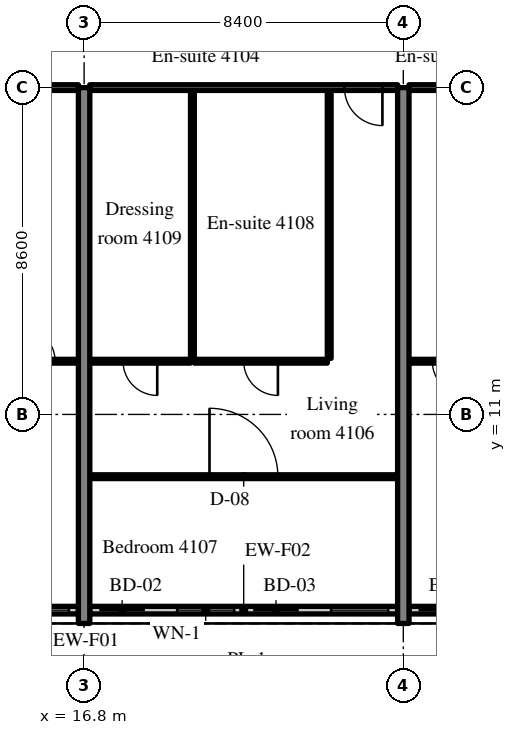
"""IFC4 building model, lengths in metres.
Left out: names, types, materials, properties, quantities, classifications, styles, units other than length and angle.
Written with IfcOpenShell. Run it as: python <this file> out.ifc"""

import sys

from ifc_helpers import new_model, si_unit, direction, frame, frame_2d, origin, place, context, subcontext, project, spatial, rectangle, extrude, source, transform, mapped, element, fill, save


model = new_model("IFC4")
c1 = context("Model", 3, precision=1e-05, world=origin(), true_north=direction((0.0, 1.0)))
c2 = subcontext(c1, "Body", "Model", "MODEL_VIEW")
j1 = project(units=[si_unit("LENGTHUNIT", "METRE"), si_unit("PLANEANGLEUNIT", "RADIAN")], contexts=[c1])
p1 = place(None, origin())
s1 = spatial("IfcSite", under=j1, at=p1, CompositionType="ELEMENT")
p2 = place(p1, origin())
s2 = spatial("IfcBuilding", under=s1, at=p2, CompositionType="ELEMENT")
p3 = place(p2, frame((0.0, 0.0, 170.6)))
s3 = spatial("IfcBuildingStorey", under=s2, at=p3, CompositionType="ELEMENT", Elevation=170.6)
m1 = source(origin(), c2, "Body", "SweptSolid", [
    extrude(rectangle(XDim=14.1, YDim=0.3, at=frame_2d((7.05, 0.0))), origin(), (0.0, 0.0, 1.0), 3.52),
])
for number, where, z_axis, x_axis in (
    (1, (16.8, 5.5, 0.0), (0.0, 0.0, 1.0), (0.0, 1.0, 0.0)),
    (2, (25.2, 5.5, 0.0), (0.0, 0.0, 1.0), (0.0, 1.0, 0.0)),
):
    element("IfcWall", number, at=place(p3, frame(where, z_axis=z_axis, x_axis=x_axis)), inside=s3, PredefinedType="SHEAR", context=c2, shape_type="MappedRepresentation", body=[
        mapped(m1, transform((0.0, 0.0, 0.0), scale=1.0)),
    ])
m2 = source(origin(), c2, "Body", "SweptSolid", [
    extrude(rectangle(XDim=4.105, YDim=0.2, at=frame_2d((2.052, 0.0))), origin(), (0.0, 0.0, 1.0), 2.87),
])
p4 = place(p3, frame((12.545, 5.85, 0.0), z_axis=(0.0, 0.0, 1.0), x_axis=(1.0, 0.0, 0.0)))
e3 = element("IfcWall", 3, at=p4, inside=s3, PredefinedType="SOLIDWALL", context=c2, shape_type="MappedRepresentation", body=[
    mapped(m2, transform((0.0, 0.0, 0.0), scale=1.0)),
])
m3 = source(origin(), c2, "Body", "SweptSolid", [
    extrude(rectangle(XDim=1.2, YDim=2.4, at=frame_2d((0.6, 1.2))), frame((0.0, 0.11, 0.0), z_axis=(0.0, -1.0, 0.0), x_axis=(1.0, 0.0, 0.0)), (0.0, 0.0, 1.0), 0.22),
])
p5 = place(p4, frame((0.25, 0.0, 0.0)))
e4 = element("IfcOpeningElement", 4, at=p5, cuts=e3, PredefinedType="OPENING", context=c2, shape_type="MappedRepresentation", body=[
    mapped(m3, transform((0.0, 0.0, 0.0), scale=1.0)),
])
m4 = source(origin(), c2, "Body", "SweptSolid", [
    extrude(rectangle(XDim=1.5, YDim=1.5, at=frame_2d((0.75, 0.75))), frame((0.0, 0.11, 0.0), z_axis=(0.0, -1.0, 0.0), x_axis=(1.0, 0.0, 0.0)), (0.0, 0.0, 1.0), 0.22),
])
p6 = place(p4, frame((2.355, 0.0, 0.9)))
e5 = element("IfcOpeningElement", 5, at=p6, cuts=e3, PredefinedType="OPENING", context=c2, shape_type="MappedRepresentation", body=[
    mapped(m4, transform((0.0, 0.0, 0.0), scale=1.0)),
])
m5 = source(origin(), c2, "Body", "SweptSolid", [
    extrude(rectangle(XDim=8.1, YDim=0.2, at=frame_2d((4.05, 0.0))), origin(), (0.0, 0.0, 1.0), 2.87),
])
p7 = place(p3, frame((16.95, 5.85, 0.0), z_axis=(0.0, 0.0, 1.0), x_axis=(1.0, 0.0, 0.0)))
e6 = element("IfcWall", 6, at=p7, inside=s3, PredefinedType="SOLIDWALL", context=c2, shape_type="MappedRepresentation", body=[
    mapped(m5, transform((0.0, 0.0, 0.0), scale=1.0)),
])
p8 = place(p7, frame((0.25, 0.0, 0.0)))
e7 = element("IfcOpeningElement", 7, at=p8, cuts=e6, PredefinedType="OPENING", context=c2, shape_type="MappedRepresentation", body=[
    mapped(m3, transform((0.0, 0.0, 0.0), scale=1.0)),
])
p9 = place(p7, frame((2.3, 0.0, 0.9)))
e8 = element("IfcOpeningElement", 8, at=p9, cuts=e6, PredefinedType="OPENING", context=c2, shape_type="MappedRepresentation", body=[
    mapped(m4, transform((0.0, 0.0, 0.0), scale=1.0)),
])
p10 = place(p7, frame((4.3, 0.0, 0.0)))
e9 = element("IfcOpeningElement", 9, at=p10, cuts=e6, PredefinedType="OPENING", context=c2, shape_type="MappedRepresentation", body=[
    mapped(m3, transform((0.0, 0.0, 0.0), scale=1.0)),
])
p11 = place(p7, frame((6.35, 0.0, 0.9)))
e10 = element("IfcOpeningElement", 10, at=p11, cuts=e6, PredefinedType="OPENING", context=c2, shape_type="MappedRepresentation", body=[
    mapped(m4, transform((0.0, 0.0, 0.0), scale=1.0)),
])
m6 = source(origin(), c2, "Body", "SweptSolid", [
    extrude(rectangle(XDim=8.1, YDim=0.2, at=frame_2d((4.05, 0.0))), origin(), (0.0, 0.0, 1.0), 2.87),
])
p12 = place(p3, frame((25.35, 5.85, 0.0), z_axis=(0.0, 0.0, 1.0), x_axis=(1.0, 0.0, 0.0)))
e11 = element("IfcWall", 11, at=p12, inside=s3, PredefinedType="SOLIDWALL", context=c2, shape_type="MappedRepresentation", body=[
    mapped(m6, transform((0.0, 0.0, 0.0), scale=1.0)),
])
p13 = place(p12, frame((0.25, 0.0, 0.0)))
e12 = element("IfcOpeningElement", 12, at=p13, cuts=e11, PredefinedType="OPENING", context=c2, shape_type="MappedRepresentation", body=[
    mapped(m3, transform((0.0, 0.0, 0.0), scale=1.0)),
])
p14 = place(p12, frame((2.3, 0.0, 0.9)))
e13 = element("IfcOpeningElement", 13, at=p14, cuts=e11, PredefinedType="OPENING", context=c2, shape_type="MappedRepresentation", body=[
    mapped(m4, transform((0.0, 0.0, 0.0), scale=1.0)),
])
p15 = place(p12, frame((4.3, 0.0, 0.0)))
e14 = element("IfcOpeningElement", 14, at=p15, cuts=e11, PredefinedType="OPENING", context=c2, shape_type="MappedRepresentation", body=[
    mapped(m3, transform((0.0, 0.0, 0.0), scale=1.0)),
])
p16 = place(p12, frame((6.35, 0.0, 0.9)))
e15 = element("IfcOpeningElement", 15, at=p16, cuts=e11, PredefinedType="OPENING", context=c2, shape_type="MappedRepresentation", body=[
    mapped(m4, transform((0.0, 0.0, 0.0), scale=1.0)),
])
m7 = source(origin(), c2, "Body", "SweptSolid", [
    extrude(rectangle(XDim=2.125, YDim=0.1, at=frame_2d((1.062, 0.0))), origin(), (0.0, 0.0, 1.0), 3.52),
])
p17 = place(p3, frame((14.525, 12.4, 0.0), z_axis=(0.0, 0.0, 1.0), x_axis=(1.0, 0.0, 0.0)))
e16 = element("IfcWall", 16, at=p17, inside=s3, PredefinedType="PARTITIONING", context=c2, shape_type="MappedRepresentation", body=[
    mapped(m7, transform((0.0, 0.0, 0.0), scale=1.0)),
])
m8 = source(origin(), c2, "Body", "SweptSolid", [
    extrude(rectangle(XDim=0.9, YDim=2.1, at=frame_2d((0.45, 1.05))), frame((0.0, 0.06, 0.0), z_axis=(0.0, -1.0, 0.0), x_axis=(1.0, 0.0, 0.0)), (0.0, 0.0, 1.0), 0.12),
])
p18 = place(p17, frame((0.612, 0.0, 0.0)))
e17 = element("IfcOpeningElement", 17, at=p18, cuts=e16, PredefinedType="OPENING", context=c2, shape_type="MappedRepresentation", body=[
    mapped(m8, transform((0.0, 0.0, 0.0), scale=1.0)),
])
m9 = source(origin(), c2, "Body", "SweptSolid", [
    extrude(rectangle(XDim=3.975, YDim=0.15, at=frame_2d((1.987, 0.0))), origin(), (0.0, 0.0, 1.0), 2.82),
])
p19 = place(p3, frame((12.675, 19.6, 0.0), z_axis=(0.0, 0.0, 1.0), x_axis=(1.0, 0.0, 0.0)))
e18 = element("IfcWall", 18, at=p19, inside=s3, PredefinedType="PARTITIONING", context=c2, shape_type="MappedRepresentation", body=[
    mapped(m9, transform((0.0, 0.0, 0.0), scale=1.0)),
])
m10 = source(origin(), c2, "Body", "SweptSolid", [
    extrude(rectangle(XDim=1.0, YDim=2.1, at=frame_2d((0.5, 1.05))), frame((0.0, 0.085, 0.0), z_axis=(0.0, -1.0, 0.0), x_axis=(1.0, 0.0, 0.0)), (0.0, 0.0, 1.0), 0.17),
])
p20 = place(p19, frame((0.4, 0.0, 0.0)))
e19 = element("IfcOpeningElement", 19, at=p20, cuts=e18, PredefinedType="OPENING", context=c2, shape_type="MappedRepresentation", body=[
    mapped(m10, transform((0.0, 0.0, 0.0), scale=1.0)),
])
m11 = source(origin(), c2, "Body", "SweptSolid", [
    extrude(rectangle(XDim=7.05, YDim=0.1, at=frame_2d((3.525, 0.0))), origin(), (0.0, 0.0, 1.0), 3.52),
])
for number, where, z_axis, x_axis in (
    (20, (23.25, 12.475, 0.0), (0.0, 0.0, 1.0), (0.0, 1.0, 0.0)),
    (21, (19.65, 12.475, 0.0), (0.0, 0.0, 1.0), (0.0, 1.0, 0.0)),
):
    element("IfcWall", number, at=place(p3, frame(where, z_axis=z_axis, x_axis=x_axis)), inside=s3, PredefinedType="PARTITIONING", context=c2, shape_type="MappedRepresentation", body=[
        mapped(m11, transform((0.0, 0.0, 0.0), scale=1.0)),
    ])
m12 = source(origin(), c2, "Body", "SweptSolid", [
    extrude(rectangle(XDim=3.5, YDim=0.1, at=frame_2d((1.75, 0.0))), origin(), (0.0, 0.0, 1.0), 3.52),
])
p21 = place(p3, frame((19.7, 12.4, 0.0), z_axis=(0.0, 0.0, 1.0), x_axis=(1.0, 0.0, 0.0)))
e22 = element("IfcWall", 22, at=p21, inside=s3, PredefinedType="PARTITIONING", context=c2, shape_type="MappedRepresentation", body=[
    mapped(m12, transform((0.0, 0.0, 0.0), scale=1.0)),
])
p22 = place(p21, frame((1.3, 0.0, 0.0)))
e23 = element("IfcOpeningElement", 23, at=p22, cuts=e22, PredefinedType="OPENING", context=c2, shape_type="MappedRepresentation", body=[
    mapped(m8, transform((0.0, 0.0, 0.0), scale=1.0)),
])
m13 = source(origin(), c2, "Body", "SweptSolid", [
    extrude(rectangle(XDim=2.65, YDim=0.1, at=frame_2d((1.325, 0.0))), origin(), (0.0, 0.0, 1.0), 3.52),
])
p23 = place(p3, frame((16.95, 12.4, 0.0), z_axis=(0.0, 0.0, 1.0), x_axis=(1.0, 0.0, 0.0)))
e24 = element("IfcWall", 24, at=p23, inside=s3, PredefinedType="PARTITIONING", context=c2, shape_type="MappedRepresentation", body=[
    mapped(m13, transform((0.0, 0.0, 0.0), scale=1.0)),
])
p24 = place(p23, frame((0.875, 0.0, 0.0)))
e25 = element("IfcOpeningElement", 25, at=p24, cuts=e24, PredefinedType="OPENING", context=c2, shape_type="MappedRepresentation", body=[
    mapped(m8, transform((0.0, 0.0, 0.0), scale=1.0)),
])
m14 = source(origin(), c2, "Body", "SweptSolid", [
    extrude(rectangle(XDim=8.1, YDim=0.1, at=frame_2d((4.05, 0.0))), origin(), (0.0, 0.0, 1.0), 3.52),
])
p25 = place(p3, frame((16.95, 9.362, 0.0), z_axis=(0.0, 0.0, 1.0), x_axis=(1.0, 0.0, 0.0)))
e26 = element("IfcWall", 26, at=p25, inside=s3, PredefinedType="PARTITIONING", context=c2, shape_type="MappedRepresentation", body=[
    mapped(m14, transform((0.0, 0.0, 0.0), scale=1.0)),
])
m15 = source(origin(), c2, "Body", "SweptSolid", [
    extrude(rectangle(XDim=1.8, YDim=2.1, at=frame_2d((0.9, 1.05))), frame((0.0, 0.06, 0.0), z_axis=(0.0, -1.0, 0.0), x_axis=(1.0, 0.0, 0.0)), (0.0, 0.0, 1.0), 0.12),
])
p26 = place(p25, frame((3.15, 0.0, 0.0)))
e27 = element("IfcOpeningElement", 27, at=p26, cuts=e26, PredefinedType="OPENING", context=c2, shape_type="MappedRepresentation", body=[
    mapped(m15, transform((0.0, 0.0, 0.0), scale=1.0)),
])
m16 = source(origin(), c2, "Body", "SweptSolid", [
    extrude(rectangle(XDim=8.1, YDim=0.15, at=frame_2d((4.05, 0.0))), origin(), (0.0, 0.0, 1.0), 2.82),
])
p27 = place(p3, frame((16.95, 19.6, 0.0), z_axis=(0.0, 0.0, 1.0), x_axis=(1.0, 0.0, 0.0)))
e28 = element("IfcWall", 28, at=p27, inside=s3, PredefinedType="PARTITIONING", context=c2, shape_type="MappedRepresentation", body=[
    mapped(m16, transform((0.0, 0.0, 0.0), scale=1.0)),
])
p28 = place(p27, frame((6.7, 0.0, 0.0)))
e29 = element("IfcOpeningElement", 29, at=p28, cuts=e28, PredefinedType="OPENING", context=c2, shape_type="MappedRepresentation", body=[
    mapped(m10, transform((0.0, 0.0, 0.0), scale=1.0)),
])
p29 = place(p3, frame((25.35, 12.4, 0.0), z_axis=(0.0, 0.0, 1.0), x_axis=(1.0, 0.0, 0.0)))
e30 = element("IfcWall", 30, at=p29, inside=s3, PredefinedType="PARTITIONING", context=c2, shape_type="MappedRepresentation", body=[
    mapped(m7, transform((0.0, 0.0, 0.0), scale=1.0)),
])
p30 = place(p29, frame((0.613, 0.0, 0.0)))
e31 = element("IfcOpeningElement", 31, at=p30, cuts=e30, PredefinedType="OPENING", context=c2, shape_type="MappedRepresentation", body=[
    mapped(m8, transform((0.0, 0.0, 0.0), scale=1.0)),
])
p31 = place(p3, frame((25.35, 19.6, 0.0), z_axis=(0.0, 0.0, 1.0), x_axis=(1.0, 0.0, 0.0)))
e32 = element("IfcWall", 32, at=p31, inside=s3, PredefinedType="PARTITIONING", context=c2, shape_type="MappedRepresentation", body=[
    mapped(m9, transform((0.0, 0.0, 0.0), scale=1.0)),
])
p32 = place(p31, frame((2.575, 0.0, 0.0)))
e33 = element("IfcOpeningElement", 33, at=p32, cuts=e32, PredefinedType="OPENING", context=c2, shape_type="MappedRepresentation", body=[
    mapped(m10, transform((0.0, 0.0, 0.0), scale=1.0)),
])
m17 = source(origin(), c2, "Body", "SweptSolid", [
    extrude(rectangle(XDim=1.5, YDim=1.5, at=frame_2d((0.75, 0.75))), frame((0.0, 0.03, 0.0), z_axis=(0.0, -1.0, 0.0), x_axis=(1.0, 0.0, 0.0)), (0.0, 0.0, 1.0), 0.06),
])
p33 = place(p6, origin())
e34 = element("IfcWindow", 34, at=p33, inside=s3, PartitioningType="SINGLE_PANEL", PredefinedType="WINDOW", context=c2, shape_type="MappedRepresentation", body=[
    mapped(m17, transform((0.0, 0.0, 0.0), scale=1.0)),
])
fill(e5, e34)
m18 = source(origin(), c2, "Body", "SweptSolid", [
    extrude(rectangle(XDim=1.2, YDim=2.4, at=frame_2d((0.6, 1.2))), frame((0.0, 0.025, 0.0), z_axis=(0.0, -1.0, 0.0), x_axis=(1.0, 0.0, 0.0)), (0.0, 0.0, 1.0), 0.05),
])
p34 = place(p8, origin())
e35 = element("IfcDoor", 35, at=p34, inside=s3, OperationType="SLIDING_TO_RIGHT", PredefinedType="DOOR", context=c2, shape_type="MappedRepresentation", body=[
    mapped(m18, transform((0.0, 0.0, 0.0), scale=1.0)),
])
fill(e7, e35)
p35 = place(p9, origin())
e36 = element("IfcWindow", 36, at=p35, inside=s3, PartitioningType="SINGLE_PANEL", PredefinedType="WINDOW", context=c2, shape_type="MappedRepresentation", body=[
    mapped(m17, transform((0.0, 0.0, 0.0), scale=1.0)),
])
fill(e8, e36)
p36 = place(p10, origin())
e37 = element("IfcDoor", 37, at=p36, inside=s3, OperationType="SLIDING_TO_LEFT", PredefinedType="DOOR", context=c2, shape_type="MappedRepresentation", body=[
    mapped(m18, transform((0.0, 0.0, 0.0), scale=1.0)),
])
fill(e9, e37)
p37 = place(p11, origin())
e38 = element("IfcWindow", 38, at=p37, inside=s3, PartitioningType="SINGLE_PANEL", PredefinedType="WINDOW", context=c2, shape_type="MappedRepresentation", body=[
    mapped(m17, transform((0.0, 0.0, 0.0), scale=1.0)),
])
fill(e10, e38)
p38 = place(p13, origin())
e39 = element("IfcDoor", 39, at=p38, inside=s3, OperationType="SLIDING_TO_RIGHT", PredefinedType="DOOR", context=c2, shape_type="MappedRepresentation", body=[
    mapped(m18, transform((0.0, 0.0, 0.0), scale=1.0)),
])
fill(e12, e39)
m19 = source(origin(), c2, "Body", "SweptSolid", [
    extrude(rectangle(XDim=0.9, YDim=2.1, at=frame_2d((0.45, 1.05))), frame((0.0, 0.025, 0.0), z_axis=(0.0, -1.0, 0.0), x_axis=(1.0, 0.0, 0.0)), (0.0, 0.0, 1.0), 0.05),
])
p39 = place(p18, origin())
e40 = element("IfcDoor", 40, at=p39, inside=s3, OperationType="SINGLE_SWING_LEFT", PredefinedType="DOOR", context=c2, shape_type="MappedRepresentation", body=[
    mapped(m19, transform((0.0, 0.0, 0.0), scale=1.0)),
])
fill(e17, e40)
p40 = place(p22, origin())
e41 = element("IfcDoor", 41, at=p40, inside=s3, OperationType="SINGLE_SWING_RIGHT", PredefinedType="DOOR", context=c2, shape_type="MappedRepresentation", body=[
    mapped(m19, transform((0.0, 0.0, 0.0), scale=1.0)),
])
fill(e23, e41)
p41 = place(p24, origin())
e42 = element("IfcDoor", 42, at=p41, inside=s3, OperationType="SINGLE_SWING_RIGHT", PredefinedType="DOOR", context=c2, shape_type="MappedRepresentation", body=[
    mapped(m19, transform((0.0, 0.0, 0.0), scale=1.0)),
])
fill(e25, e42)
m20 = source(origin(), c2, "Body", "SweptSolid", [
    extrude(rectangle(XDim=1.8, YDim=2.1, at=frame_2d((0.9, 1.05))), frame((0.0, 0.025, 0.0), z_axis=(0.0, -1.0, 0.0), x_axis=(1.0, 0.0, 0.0)), (0.0, 0.0, 1.0), 0.05),
])
p42 = place(p26, origin())
e43 = element("IfcDoor", 43, at=p42, inside=s3, OperationType="DOUBLE_DOOR_SINGLE_SWING", PredefinedType="DOOR", context=c2, shape_type="MappedRepresentation", body=[
    mapped(m20, transform((0.0, 0.0, 0.0), scale=1.0)),
])
fill(e27, e43)
m21 = source(origin(), c2, "Body", "SweptSolid", [
    extrude(rectangle(XDim=1.0, YDim=2.1, at=frame_2d((0.5, 1.05))), frame((0.0, 0.025, 0.0), z_axis=(0.0, -1.0, 0.0), x_axis=(1.0, 0.0, 0.0)), (0.0, 0.0, 1.0), 0.05),
])
p43 = place(p28, origin())
e44 = element("IfcDoor", 44, at=p43, inside=s3, OperationType="SINGLE_SWING_RIGHT", PredefinedType="DOOR", context=c2, shape_type="MappedRepresentation", body=[
    mapped(m21, transform((0.0, 0.0, 0.0), scale=1.0)),
])
fill(e29, e44)
p44 = place(p30, origin())
e45 = element("IfcDoor", 45, at=p44, inside=s3, OperationType="SINGLE_SWING_RIGHT", PredefinedType="DOOR", context=c2, shape_type="MappedRepresentation", body=[
    mapped(m19, transform((0.0, 0.0, 0.0), scale=1.0)),
])
fill(e31, e45)
save(model, sys.argv[1])
